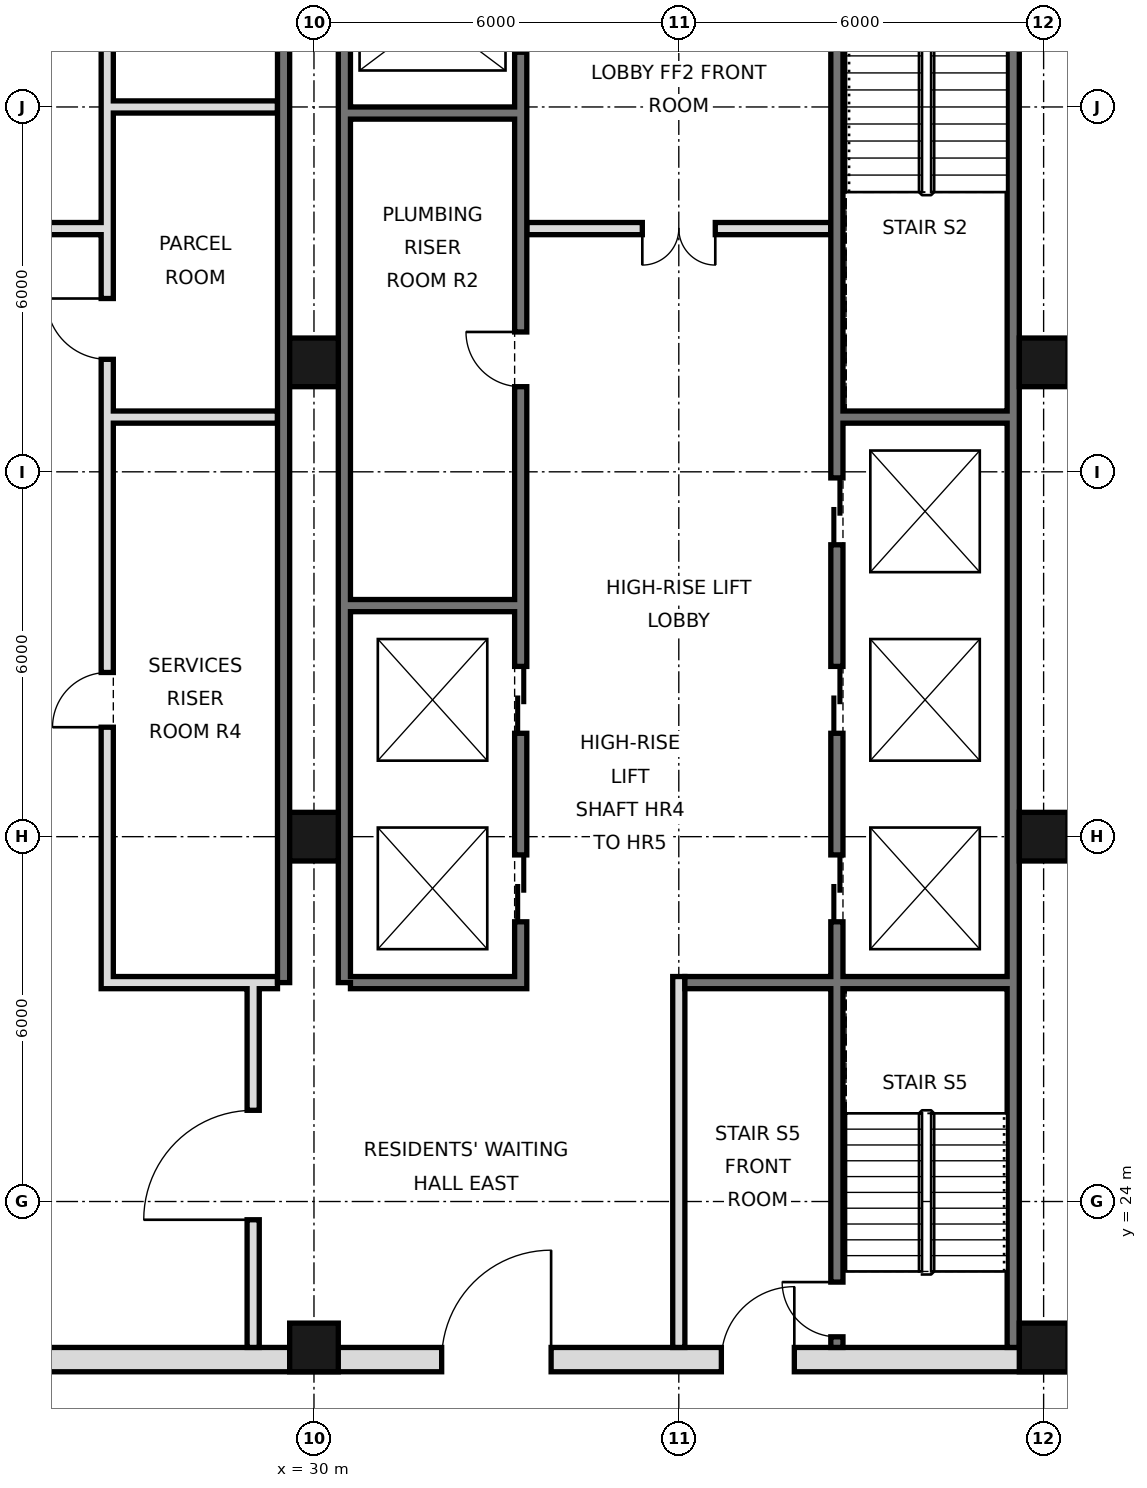
"""IFC4 building model, lengths in metres.
Left out: names, types, materials, properties, quantities, classifications, styles, units other than length and angle.
Written with IfcOpenShell. Run it as: python <this file> out.ifc"""

import sys

from ifc_helpers import new_model, si_unit, direction, frame, frame_2d, origin, origin_2d, place, context, subcontext, project, spatial, rectangle, hollow_rectangle, extrude, element, fill, save


model = new_model("IFC4")
c1 = context("Model", 3, precision=1e-05, world=origin(), true_north=direction((0.0, 1.0)))
c2 = subcontext(c1, "Body", "Model", "MODEL_VIEW")
j1 = project(units=[si_unit("LENGTHUNIT", "METRE"), si_unit("PLANEANGLEUNIT", "RADIAN")], contexts=[c1])
p1 = place(None, origin())
s1 = spatial("IfcSite", under=j1, at=p1, CompositionType="ELEMENT")
p2 = place(p1, origin())
s2 = spatial("IfcBuilding", under=s1, at=p2, CompositionType="ELEMENT")
p3 = place(p2, frame((0.0, 0.0, 199.2)))
s3 = spatial("IfcBuildingStorey", under=s2, at=p3, CompositionType="ELEMENT", Elevation=199.2)
for number, where, z_axis, x_axis in (
    (1, (30.0, 21.6, 0.0), (0.0, 0.0, 1.0), (1.0, 0.0, 0.0)),
    (2, (30.0, 30.0, 0.0), (0.0, 0.0, 1.0), (1.0, 0.0, 0.0)),
    (3, (30.0, 37.8, 0.0), (0.0, 0.0, 1.0), (1.0, 0.0, 0.0)),
    (4, (42.0, 21.6, 0.0), (0.0, 0.0, 1.0), (1.0, 0.0, 0.0)),
    (5, (42.0, 30.0, 0.0), (0.0, 0.0, 1.0), (1.0, 0.0, 0.0)),
    (6, (42.0, 37.8, 0.0), (0.0, 0.0, 1.0), (1.0, 0.0, 0.0)),
):
    element("IfcColumn", number, at=place(p3, frame(where, z_axis=z_axis, x_axis=x_axis)), inside=s3, PredefinedType="COLUMN", context=c2, shape_type="SweptSolid", body=[
        extrude(hollow_rectangle(XDim=0.8, YDim=0.8, WallThickness=0.04, at=origin_2d()), origin(), (0.0, 0.0, 1.0), 3.6),
    ])
p4 = place(p3, frame((41.5, 21.6, 0.0), z_axis=(0.0, 0.0, 1.0), x_axis=(0.0, 1.0, 0.0)))
e7 = element("IfcWall", 7, at=p4, inside=s3, PredefinedType="SOLIDWALL", context=c2, shape_type="SweptSolid", body=[
    extrude(rectangle(XDim=23.5, YDim=0.2, at=frame_2d((11.75, 0.0))), origin(), (0.0, 0.0, 1.0), 3.42),
])
for number, where, z_axis, x_axis in (
    (8, (29.5, 27.6, 0.0), (0.0, 0.0, 1.0), (0.0, 1.0, 0.0)),
    (9, (30.5, 27.6, 0.0), (0.0, 0.0, 1.0), (0.0, 1.0, 0.0)),
):
    element("IfcWall", number, at=place(p3, frame(where, z_axis=z_axis, x_axis=x_axis)), inside=s3, PredefinedType="SOLIDWALL", context=c2, shape_type="SweptSolid", body=[
        extrude(rectangle(XDim=17.5, YDim=0.2, at=frame_2d((8.75, 0.0))), origin(), (0.0, 0.0, 1.0), 3.42),
    ])
p5 = place(p3, frame((5.6, 21.4, 0.0), z_axis=(0.0, 0.0, 1.0), x_axis=(1.0, 0.0, 0.0)))
e10 = element("IfcWall", 10, at=p5, inside=s3, PredefinedType="SOLIDWALL", context=c2, shape_type="SweptSolid", body=[
    extrude(rectangle(XDim=36.8, YDim=0.4, at=frame_2d((18.4, 0.0))), origin(), (0.0, 0.0, 1.0), 3.42),
])
p6 = place(p5, frame((8.5, 0.0, 0.0)))
e11 = element("IfcOpeningElement", 11, at=p6, cuts=e10, PredefinedType="OPENING", context=c2, shape_type="SweptSolid", body=[
    extrude(rectangle(XDim=1.8, YDim=2.1, at=frame_2d((0.9, 1.05))), frame((0.0, 0.21, 0.0), z_axis=(0.0, -1.0, 0.0), x_axis=(1.0, 0.0, 0.0)), (0.0, 0.0, 1.0), 0.42),
])
p7 = place(p5, frame((17.5, 0.0, 0.0)))
e12 = element("IfcOpeningElement", 12, at=p7, cuts=e10, PredefinedType="OPENING", context=c2, shape_type="SweptSolid", body=[
    extrude(rectangle(XDim=1.8, YDim=2.1, at=frame_2d((0.9, 1.05))), frame((0.0, 0.21, 0.0), z_axis=(0.0, -1.0, 0.0), x_axis=(1.0, 0.0, 0.0)), (0.0, 0.0, 1.0), 0.42),
])
p8 = place(p5, frame((26.5, 0.0, 0.0)))
e13 = element("IfcOpeningElement", 13, at=p8, cuts=e10, PredefinedType="OPENING", context=c2, shape_type="SweptSolid", body=[
    extrude(rectangle(XDim=1.8, YDim=2.1, at=frame_2d((0.9, 1.05))), frame((0.0, 0.21, 0.0), z_axis=(0.0, -1.0, 0.0), x_axis=(1.0, 0.0, 0.0)), (0.0, 0.0, 1.0), 0.42),
])
p9 = place(p5, frame((4.5, 0.0, 0.0)))
e14 = element("IfcOpeningElement", 14, at=p9, cuts=e10, PredefinedType="OPENING", context=c2, shape_type="SweptSolid", body=[
    extrude(rectangle(XDim=1.2, YDim=2.1, at=frame_2d((0.6, 1.05))), frame((0.0, 0.21, 0.0), z_axis=(0.0, -1.0, 0.0), x_axis=(1.0, 0.0, 0.0)), (0.0, 0.0, 1.0), 0.42),
])
p10 = place(p5, frame((31.1, 0.0, 0.0)))
e15 = element("IfcOpeningElement", 15, at=p10, cuts=e10, PredefinedType="OPENING", context=c2, shape_type="SweptSolid", body=[
    extrude(rectangle(XDim=1.2, YDim=2.1, at=frame_2d((0.6, 1.05))), frame((0.0, 0.21, 0.0), z_axis=(0.0, -1.0, 0.0), x_axis=(1.0, 0.0, 0.0)), (0.0, 0.0, 1.0), 0.42),
])
p11 = place(p3, frame((29.0, 21.6, 0.0), z_axis=(0.0, 0.0, 1.0), x_axis=(0.0, 1.0, 0.0)))
e16 = element("IfcWall", 16, at=p11, inside=s3, PredefinedType="PARTITIONING", context=c2, shape_type="SweptSolid", body=[
    extrude(rectangle(XDim=6.0, YDim=0.2, at=frame_2d((3.0, 0.0))), origin(), (0.0, 0.0, 1.0), 3.42),
])
p12 = place(p11, frame((2.1, 0.0, 0.0)))
e17 = element("IfcOpeningElement", 17, at=p12, cuts=e16, PredefinedType="OPENING", context=c2, shape_type="SweptSolid", body=[
    extrude(rectangle(XDim=1.8, YDim=2.1, at=frame_2d((0.9, 1.05))), frame((0.0, 0.11, 0.0), z_axis=(0.0, -1.0, 0.0), x_axis=(1.0, 0.0, 0.0)), (0.0, 0.0, 1.0), 0.22),
])
p13 = place(p3, frame((26.6, 27.5, 0.0), z_axis=(0.0, 0.0, 1.0), x_axis=(0.0, 1.0, 0.0)))
e18 = element("IfcWall", 18, at=p13, inside=s3, PredefinedType="SOLIDWALL", context=c2, shape_type="SweptSolid", body=[
    extrude(rectangle(XDim=17.5, YDim=0.2, at=frame_2d((8.75, 0.0))), origin(), (0.0, 0.0, 1.0), 3.42),
])
p14 = place(p13, frame((4.3, 0.0, 0.0)))
e19 = element("IfcOpeningElement", 19, at=p14, cuts=e18, PredefinedType="OPENING", context=c2, shape_type="SweptSolid", body=[
    extrude(rectangle(XDim=0.9, YDim=2.1, at=frame_2d((0.45, 1.05))), frame((0.0, 0.11, 0.0), z_axis=(0.0, -1.0, 0.0), x_axis=(1.0, 0.0, 0.0)), (0.0, 0.0, 1.0), 0.22),
])
p15 = place(p13, frame((10.35, 0.0, 0.0)))
e20 = element("IfcOpeningElement", 20, at=p15, cuts=e18, PredefinedType="OPENING", context=c2, shape_type="SweptSolid", body=[
    extrude(rectangle(XDim=1.0, YDim=2.1, at=frame_2d((0.5, 1.05))), frame((0.0, 0.11, 0.0), z_axis=(0.0, -1.0, 0.0), x_axis=(1.0, 0.0, 0.0)), (0.0, 0.0, 1.0), 0.22),
])
p16 = place(p13, frame((15.475, 0.0, 0.0)))
e21 = element("IfcOpeningElement", 21, at=p16, cuts=e18, PredefinedType="OPENING", context=c2, shape_type="SweptSolid", body=[
    extrude(rectangle(XDim=1.0, YDim=2.1, at=frame_2d((0.5, 1.05))), frame((0.0, 0.11, 0.0), z_axis=(0.0, -1.0, 0.0), x_axis=(1.0, 0.0, 0.0)), (0.0, 0.0, 1.0), 0.22),
])
p17 = place(p3, frame((33.4, 27.5, 0.0), z_axis=(0.0, 0.0, 1.0), x_axis=(0.0, 1.0, 0.0)))
e22 = element("IfcWall", 22, at=p17, inside=s3, PredefinedType="SOLIDWALL", context=c2, shape_type="SweptSolid", body=[
    extrude(rectangle(XDim=17.5, YDim=0.2, at=frame_2d((8.75, 0.0))), origin(), (0.0, 0.0, 1.0), 3.42),
])
p18 = place(p17, frame((1.1, 0.0, 0.0)))
e23 = element("IfcOpeningElement", 23, at=p18, cuts=e22, PredefinedType="OPENING", context=c2, shape_type="SweptSolid", body=[
    extrude(rectangle(XDim=1.1, YDim=2.1, at=frame_2d((0.55, 1.05))), frame((0.0, 0.11, 0.0), z_axis=(0.0, -1.0, 0.0), x_axis=(1.0, 0.0, 0.0)), (0.0, 0.0, 1.0), 0.22),
])
p19 = place(p17, frame((4.2, 0.0, 0.0)))
e24 = element("IfcOpeningElement", 24, at=p19, cuts=e22, PredefinedType="OPENING", context=c2, shape_type="SweptSolid", body=[
    extrude(rectangle(XDim=1.1, YDim=2.1, at=frame_2d((0.55, 1.05))), frame((0.0, 0.11, 0.0), z_axis=(0.0, -1.0, 0.0), x_axis=(1.0, 0.0, 0.0)), (0.0, 0.0, 1.0), 0.22),
])
p20 = place(p17, frame((15.4, 0.0, 0.0)))
e25 = element("IfcOpeningElement", 25, at=p20, cuts=e22, PredefinedType="OPENING", context=c2, shape_type="SweptSolid", body=[
    extrude(rectangle(XDim=1.1, YDim=2.1, at=frame_2d((0.55, 1.05))), frame((0.0, 0.11, 0.0), z_axis=(0.0, -1.0, 0.0), x_axis=(1.0, 0.0, 0.0)), (0.0, 0.0, 1.0), 0.22),
])
p21 = place(p17, frame((9.9, 0.0, 0.0)))
e26 = element("IfcOpeningElement", 26, at=p21, cuts=e22, PredefinedType="OPENING", context=c2, shape_type="SweptSolid", body=[
    extrude(rectangle(XDim=0.9, YDim=2.1, at=frame_2d((0.45, 1.05))), frame((0.0, 0.11, 0.0), z_axis=(0.0, -1.0, 0.0), x_axis=(1.0, 0.0, 0.0)), (0.0, 0.0, 1.0), 0.22),
])
p22 = place(p3, frame((36.0, 21.6, 0.0), z_axis=(0.0, 0.0, 1.0), x_axis=(0.0, 1.0, 0.0)))
e27 = element("IfcWall", 27, at=p22, inside=s3, PredefinedType="PARTITIONING", context=c2, shape_type="SweptSolid", body=[
    extrude(rectangle(XDim=6.1, YDim=0.2, at=frame_2d((3.05, 0.0))), origin(), (0.0, 0.0, 1.0), 3.42),
])
p23 = place(p3, frame((38.6, 21.6, 0.0), z_axis=(0.0, 0.0, 1.0), x_axis=(0.0, 1.0, 0.0)))
e28 = element("IfcWall", 28, at=p23, inside=s3, PredefinedType="SOLIDWALL", context=c2, shape_type="SweptSolid", body=[
    extrude(rectangle(XDim=23.4, YDim=0.2, at=frame_2d((11.7, 0.0))), origin(), (0.0, 0.0, 1.0), 3.42),
])
p24 = place(p23, frame((7.0, 0.0, 0.0)))
e29 = element("IfcOpeningElement", 29, at=p24, cuts=e28, PredefinedType="OPENING", context=c2, shape_type="SweptSolid", body=[
    extrude(rectangle(XDim=1.1, YDim=2.1, at=frame_2d((0.55, 1.05))), frame((0.0, 0.11, 0.0), z_axis=(0.0, -1.0, 0.0), x_axis=(1.0, 0.0, 0.0)), (0.0, 0.0, 1.0), 0.22),
])
p25 = place(p23, frame((10.1, 0.0, 0.0)))
e30 = element("IfcOpeningElement", 30, at=p25, cuts=e28, PredefinedType="OPENING", context=c2, shape_type="SweptSolid", body=[
    extrude(rectangle(XDim=1.1, YDim=2.1, at=frame_2d((0.55, 1.05))), frame((0.0, 0.11, 0.0), z_axis=(0.0, -1.0, 0.0), x_axis=(1.0, 0.0, 0.0)), (0.0, 0.0, 1.0), 0.22),
])
p26 = place(p23, frame((13.2, 0.0, 0.0)))
e31 = element("IfcOpeningElement", 31, at=p26, cuts=e28, PredefinedType="OPENING", context=c2, shape_type="SweptSolid", body=[
    extrude(rectangle(XDim=1.1, YDim=2.1, at=frame_2d((0.55, 1.05))), frame((0.0, 0.11, 0.0), z_axis=(0.0, -1.0, 0.0), x_axis=(1.0, 0.0, 0.0)), (0.0, 0.0, 1.0), 0.22),
])
p27 = place(p23, frame((22.1, 0.0, 0.0)))
e32 = element("IfcOpeningElement", 32, at=p27, cuts=e28, PredefinedType="OPENING", context=c2, shape_type="SweptSolid", body=[
    extrude(rectangle(XDim=1.0, YDim=2.1, at=frame_2d((0.5, 1.05))), frame((0.0, 0.11, 0.0), z_axis=(0.0, -1.0, 0.0), x_axis=(1.0, 0.0, 0.0)), (0.0, 0.0, 1.0), 0.22),
])
p28 = place(p23, frame((0.175, 0.0, 0.0)))
e33 = element("IfcOpeningElement", 33, at=p28, cuts=e28, PredefinedType="OPENING", context=c2, shape_type="SweptSolid", body=[
    extrude(rectangle(XDim=0.9, YDim=2.1, at=frame_2d((0.45, 1.05))), frame((0.0, 0.11, 0.0), z_axis=(0.0, -1.0, 0.0), x_axis=(1.0, 0.0, 0.0)), (0.0, 0.0, 1.0), 0.22),
])
for number, where, z_axis, x_axis in (
    (34, (26.7, 27.6, 0.0), (0.0, 0.0, 1.0), (1.0, 0.0, 0.0)),
    (35, (30.6, 27.6, 0.0), (0.0, 0.0, 1.0), (1.0, 0.0, 0.0)),
):
    element("IfcWall", number, at=place(p3, frame(where, z_axis=z_axis, x_axis=x_axis)), inside=s3, PredefinedType="SOLIDWALL", context=c2, shape_type="SweptSolid", body=[
        extrude(rectangle(XDim=2.7, YDim=0.2, at=frame_2d((1.35, 0.0))), origin(), (0.0, 0.0, 1.0), 3.42),
    ])
p29 = place(p3, frame((36.1, 27.6, 0.0), z_axis=(0.0, 0.0, 1.0), x_axis=(1.0, 0.0, 0.0)))
e36 = element("IfcWall", 36, at=p29, inside=s3, PredefinedType="SOLIDWALL", context=c2, shape_type="SweptSolid", body=[
    extrude(rectangle(XDim=5.3, YDim=0.2, at=frame_2d((2.65, 0.0))), origin(), (0.0, 0.0, 1.0), 3.42),
])
for number, where, z_axis, x_axis in (
    (37, (30.6, 33.8, 0.0), (0.0, 0.0, 1.0), (1.0, 0.0, 0.0)),
    (38, (26.7, 36.9, 0.0), (0.0, 0.0, 1.0), (1.0, 0.0, 0.0)),
    (39, (38.7, 36.9, 0.0), (0.0, 0.0, 1.0), (1.0, 0.0, 0.0)),
):
    element("IfcWall", number, at=place(p3, frame(where, z_axis=z_axis, x_axis=x_axis)), inside=s3, PredefinedType="SOLIDWALL", context=c2, shape_type="SweptSolid", body=[
        extrude(rectangle(XDim=2.7, YDim=0.2, at=frame_2d((1.35, 0.0))), origin(), (0.0, 0.0, 1.0), 3.42),
    ])
p30 = place(p3, frame((21.5, 40.0, 0.0), z_axis=(0.0, 0.0, 1.0), x_axis=(1.0, 0.0, 0.0)))
e40 = element("IfcWall", 40, at=p30, inside=s3, PredefinedType="PARTITIONING", context=c2, shape_type="SweptSolid", body=[
    extrude(rectangle(XDim=5.0, YDim=0.2, at=frame_2d((2.5, 0.0))), origin(), (0.0, 0.0, 1.0), 3.42),
])
p31 = place(p30, frame((1.9, 0.0, 0.0)))
e41 = element("IfcOpeningElement", 41, at=p31, cuts=e40, PredefinedType="OPENING", context=c2, shape_type="SweptSolid", body=[
    extrude(rectangle(XDim=1.2, YDim=2.1, at=frame_2d((0.6, 1.05))), frame((0.0, 0.11, 0.0), z_axis=(0.0, -1.0, 0.0), x_axis=(1.0, 0.0, 0.0)), (0.0, 0.0, 1.0), 0.22),
])
p32 = place(p3, frame((33.5, 40.0, 0.0), z_axis=(0.0, 0.0, 1.0), x_axis=(1.0, 0.0, 0.0)))
e42 = element("IfcWall", 42, at=p32, inside=s3, PredefinedType="PARTITIONING", context=c2, shape_type="SweptSolid", body=[
    extrude(rectangle(XDim=5.0, YDim=0.2, at=frame_2d((2.5, 0.0))), origin(), (0.0, 0.0, 1.0), 3.42),
])
p33 = place(p32, frame((1.9, 0.0, 0.0)))
e43 = element("IfcOpeningElement", 43, at=p33, cuts=e42, PredefinedType="OPENING", context=c2, shape_type="SweptSolid", body=[
    extrude(rectangle(XDim=1.2, YDim=2.1, at=frame_2d((0.6, 1.05))), frame((0.0, 0.11, 0.0), z_axis=(0.0, -1.0, 0.0), x_axis=(1.0, 0.0, 0.0)), (0.0, 0.0, 1.0), 0.22),
])
p34 = place(p3, frame((30.6, 41.9, 0.0), z_axis=(0.0, 0.0, 1.0), x_axis=(1.0, 0.0, 0.0)))
e44 = element("IfcWall", 44, at=p34, inside=s3, PredefinedType="SOLIDWALL", context=c2, shape_type="SweptSolid", body=[
    extrude(rectangle(XDim=2.7, YDim=0.2, at=frame_2d((1.35, 0.0))), origin(), (0.0, 0.0, 1.0), 3.42),
])
p35 = place(p3, frame((26.7, 42.0, 0.0), z_axis=(0.0, 0.0, 1.0), x_axis=(1.0, 0.0, 0.0)))
e45 = element("IfcWall", 45, at=p35, inside=s3, PredefinedType="PARTITIONING", context=c2, shape_type="SweptSolid", body=[
    extrude(rectangle(XDim=2.7, YDim=0.2, at=frame_2d((1.35, 0.0))), origin(), (0.0, 0.0, 1.0), 3.42),
])
p36 = place(p12, origin())
e46 = element("IfcDoor", 46, at=p36, inside=s3, OperationType="SINGLE_SWING_LEFT", PredefinedType="DOOR", context=c2, shape_type="SweptSolid", body=[
    extrude(rectangle(XDim=1.8, YDim=2.1, at=frame_2d((0.9, 1.05))), frame((0.0, 0.025, 0.0), z_axis=(0.0, -1.0, 0.0), x_axis=(1.0, 0.0, 0.0)), (0.0, 0.0, 1.0), 0.05),
])
fill(e17, e46)
p37 = place(p8, frame((1.8, 0.0, 0.0), z_axis=(0.0, 0.0, 1.0), x_axis=(-1.0, 0.0, 0.0)))
e47 = element("IfcDoor", 47, at=p37, inside=s3, OperationType="SINGLE_SWING_LEFT", PredefinedType="DOOR", context=c2, shape_type="SweptSolid", body=[
    extrude(rectangle(XDim=1.8, YDim=2.1, at=frame_2d((0.9, 1.05))), frame((0.0, 0.025, 0.0), z_axis=(0.0, -1.0, 0.0), x_axis=(1.0, 0.0, 0.0)), (0.0, 0.0, 1.0), 0.05),
])
fill(e13, e47)
p38 = place(p10, frame((1.2, 0.0, 0.0), z_axis=(0.0, 0.0, 1.0), x_axis=(-1.0, 0.0, 0.0)))
e48 = element("IfcDoor", 48, at=p38, inside=s3, OperationType="SINGLE_SWING_LEFT", PredefinedType="DOOR", context=c2, shape_type="SweptSolid", body=[
    extrude(rectangle(XDim=1.2, YDim=2.1, at=frame_2d((0.6, 1.05))), frame((0.0, 0.025, 0.0), z_axis=(0.0, -1.0, 0.0), x_axis=(1.0, 0.0, 0.0)), (0.0, 0.0, 1.0), 0.05),
])
fill(e15, e48)
p39 = place(p33, frame((1.2, 0.0, 0.0), z_axis=(0.0, 0.0, 1.0), x_axis=(-1.0, 0.0, 0.0)))
e49 = element("IfcDoor", 49, at=p39, inside=s3, OperationType="DOUBLE_DOOR_SINGLE_SWING", PredefinedType="DOOR", context=c2, shape_type="SweptSolid", body=[
    extrude(rectangle(XDim=1.2, YDim=2.1, at=frame_2d((0.6, 1.05))), frame((0.0, 0.025, 0.0), z_axis=(0.0, -1.0, 0.0), x_axis=(1.0, 0.0, 0.0)), (0.0, 0.0, 1.0), 0.05),
])
fill(e43, e49)
p40 = place(p24, origin())
e50 = element("IfcDoor", 50, at=p40, inside=s3, OperationType="DOUBLE_DOOR_SLIDING", PredefinedType="DOOR", context=c2, shape_type="SweptSolid", body=[
    extrude(rectangle(XDim=1.1, YDim=2.1, at=frame_2d((0.55, 1.05))), frame((0.0, 0.025, 0.0), z_axis=(0.0, -1.0, 0.0), x_axis=(1.0, 0.0, 0.0)), (0.0, 0.0, 1.0), 0.05),
])
fill(e29, e50)
p41 = place(p25, origin())
e51 = element("IfcDoor", 51, at=p41, inside=s3, OperationType="DOUBLE_DOOR_SLIDING", PredefinedType="DOOR", context=c2, shape_type="SweptSolid", body=[
    extrude(rectangle(XDim=1.1, YDim=2.1, at=frame_2d((0.55, 1.05))), frame((0.0, 0.025, 0.0), z_axis=(0.0, -1.0, 0.0), x_axis=(1.0, 0.0, 0.0)), (0.0, 0.0, 1.0), 0.05),
])
fill(e30, e51)
p42 = place(p26, origin())
e52 = element("IfcDoor", 52, at=p42, inside=s3, OperationType="DOUBLE_DOOR_SLIDING", PredefinedType="DOOR", context=c2, shape_type="SweptSolid", body=[
    extrude(rectangle(XDim=1.1, YDim=2.1, at=frame_2d((0.55, 1.05))), frame((0.0, 0.025, 0.0), z_axis=(0.0, -1.0, 0.0), x_axis=(1.0, 0.0, 0.0)), (0.0, 0.0, 1.0), 0.05),
])
fill(e31, e52)
p43 = place(p18, origin())
e53 = element("IfcDoor", 53, at=p43, inside=s3, OperationType="DOUBLE_DOOR_SLIDING", PredefinedType="DOOR", context=c2, shape_type="SweptSolid", body=[
    extrude(rectangle(XDim=1.1, YDim=2.1, at=frame_2d((0.55, 1.05))), frame((0.0, 0.025, 0.0), z_axis=(0.0, -1.0, 0.0), x_axis=(1.0, 0.0, 0.0)), (0.0, 0.0, 1.0), 0.05),
])
fill(e23, e53)
p44 = place(p19, origin())
e54 = element("IfcDoor", 54, at=p44, inside=s3, OperationType="DOUBLE_DOOR_SLIDING", PredefinedType="DOOR", context=c2, shape_type="SweptSolid", body=[
    extrude(rectangle(XDim=1.1, YDim=2.1, at=frame_2d((0.55, 1.05))), frame((0.0, 0.025, 0.0), z_axis=(0.0, -1.0, 0.0), x_axis=(1.0, 0.0, 0.0)), (0.0, 0.0, 1.0), 0.05),
])
fill(e24, e54)
p45 = place(p28, frame((0.9, 0.0, 0.0), z_axis=(0.0, 0.0, 1.0), x_axis=(-1.0, 0.0, 0.0)))
e55 = element("IfcDoor", 55, at=p45, inside=s3, OperationType="SINGLE_SWING_LEFT", PredefinedType="DOOR", context=c2, shape_type="SweptSolid", body=[
    extrude(rectangle(XDim=0.9, YDim=2.1, at=frame_2d((0.45, 1.05))), frame((0.0, 0.025, 0.0), z_axis=(0.0, -1.0, 0.0), x_axis=(1.0, 0.0, 0.0)), (0.0, 0.0, 1.0), 0.05),
])
fill(e33, e55)
p46 = place(p21, frame((0.9, 0.0, 0.0), z_axis=(0.0, 0.0, 1.0), x_axis=(-1.0, 0.0, 0.0)))
e56 = element("IfcDoor", 56, at=p46, inside=s3, OperationType="SINGLE_SWING_LEFT", PredefinedType="DOOR", context=c2, shape_type="SweptSolid", body=[
    extrude(rectangle(XDim=0.9, YDim=2.1, at=frame_2d((0.45, 1.05))), frame((0.0, 0.025, 0.0), z_axis=(0.0, -1.0, 0.0), x_axis=(1.0, 0.0, 0.0)), (0.0, 0.0, 1.0), 0.05),
])
fill(e26, e56)
p47 = place(p14, origin())
e57 = element("IfcDoor", 57, at=p47, inside=s3, OperationType="SINGLE_SWING_LEFT", PredefinedType="DOOR", context=c2, shape_type="SweptSolid", body=[
    extrude(rectangle(XDim=0.9, YDim=2.1, at=frame_2d((0.45, 1.05))), frame((0.0, 0.025, 0.0), z_axis=(0.0, -1.0, 0.0), x_axis=(1.0, 0.0, 0.0)), (0.0, 0.0, 1.0), 0.05),
])
fill(e19, e57)
p48 = place(p15, frame((1.0, 0.0, 0.0), z_axis=(0.0, 0.0, 1.0), x_axis=(-1.0, 0.0, 0.0)))
e58 = element("IfcDoor", 58, at=p48, inside=s3, OperationType="SINGLE_SWING_LEFT", PredefinedType="DOOR", context=c2, shape_type="SweptSolid", body=[
    extrude(rectangle(XDim=1.0, YDim=2.1, at=frame_2d((0.5, 1.05))), frame((0.0, 0.025, 0.0), z_axis=(0.0, -1.0, 0.0), x_axis=(1.0, 0.0, 0.0)), (0.0, 0.0, 1.0), 0.05),
])
fill(e20, e58)
save(model, sys.argv[1])
